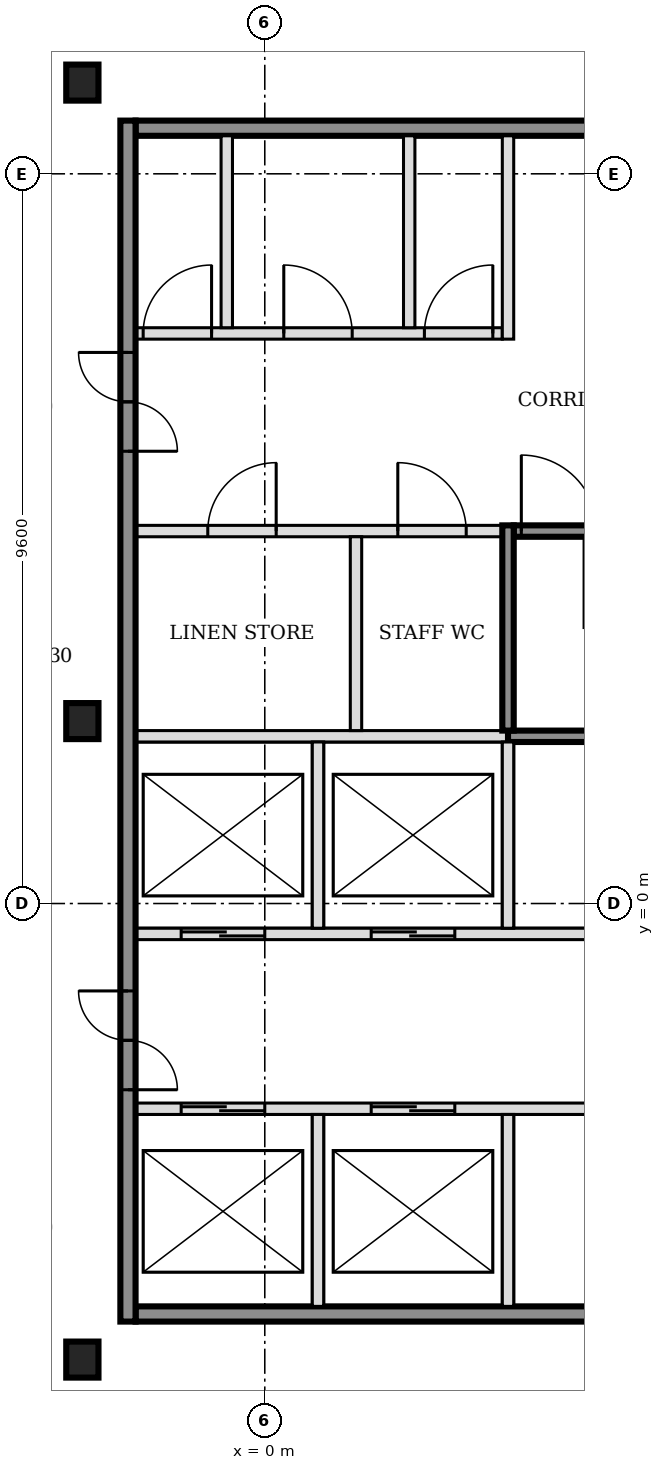
"""IFC4 building model, lengths in metres.
Left out: names, types, materials, properties, quantities, classifications, styles, units other than length and angle.
Written with IfcOpenShell. Run it as: python <this file> out.ifc"""

import sys

from ifc_helpers import new_model, si_unit, direction, frame, frame_2d, origin, origin_2d, place, context, subcontext, project, spatial, rectangle, i_section, extrude, element, fill, save


model = new_model("IFC4")
c1 = context("Model", 3, precision=1e-05, world=origin(), true_north=direction((0.0, 1.0)))
c2 = subcontext(c1, "Body", "Model", "MODEL_VIEW")
j1 = project(units=[si_unit("LENGTHUNIT", "METRE"), si_unit("PLANEANGLEUNIT", "RADIAN")], contexts=[c1])
p1 = place(None, origin())
s1 = spatial("IfcSite", under=j1, at=p1, CompositionType="ELEMENT")
p2 = place(p1, origin())
s2 = spatial("IfcBuilding", under=s1, at=p2, CompositionType="ELEMENT")
p3 = place(p2, frame((0.0, 0.0, 108.6)))
s3 = spatial("IfcBuildingStorey", under=s2, at=p3, CompositionType="ELEMENT", Elevation=108.6)
for number, where, z_axis, x_axis in (
    (1, (-2.4, -6.0, -0.15), (0.0, 0.0, 1.0), (1.0, 0.0, 0.0)),
    (2, (-2.4, 2.4, -0.15), (0.0, 0.0, 1.0), (1.0, 0.0, 0.0)),
    (3, (-2.4, 10.8, -0.15), (0.0, 0.0, 1.0), (1.0, 0.0, 0.0)),
):
    element("IfcColumn", number, at=place(p3, frame(where, z_axis=z_axis, x_axis=x_axis)), inside=s3, PredefinedType="COLUMN", context=c2, shape_type="SweptSolid", body=[
        extrude(i_section(OverallWidth=0.424, OverallDepth=0.474, WebThickness=0.048, FlangeThickness=0.077, FilletRadius=0.015, at=origin_2d()), origin(), (0.0, 0.0, 1.0), 3.6),
    ])
p4 = place(p3, frame((-1.7, -5.4, 0.0), z_axis=(0.0, 0.0, 1.0), x_axis=(1.0, 0.0, 0.0)))
e4 = element("IfcWall", 4, at=p4, inside=s3, PredefinedType="SOLIDWALL", context=c2, shape_type="SweptSolid", body=[
    extrude(rectangle(XDim=7.9, YDim=0.2, at=frame_2d((3.95, 0.0))), origin(), (0.0, 0.0, 1.0), 3.45),
])
p5 = place(p3, frame((-1.7, -2.7, 0.0), z_axis=(0.0, 0.0, 1.0), x_axis=(1.0, 0.0, 0.0)))
e5 = element("IfcWall", 5, at=p5, inside=s3, PredefinedType="SOLIDWALL", context=c2, shape_type="SweptSolid", body=[
    extrude(rectangle(XDim=7.9, YDim=0.15, at=frame_2d((3.95, 0.0))), origin(), (0.0, 0.0, 1.0), 3.45),
])
p6 = place(p5, frame((0.6, 0.0, 0.0)))
e6 = element("IfcOpeningElement", 6, at=p6, cuts=e5, PredefinedType="OPENING", context=c2, shape_type="SweptSolid", body=[
    extrude(rectangle(XDim=1.1, YDim=2.1, at=frame_2d((0.55, 1.05))), frame((0.0, 0.085, 0.0), z_axis=(0.0, -1.0, 0.0), x_axis=(1.0, 0.0, 0.0)), (0.0, 0.0, 1.0), 0.17),
])
p7 = place(p5, frame((3.1, 0.0, 0.0)))
e7 = element("IfcOpeningElement", 7, at=p7, cuts=e5, PredefinedType="OPENING", context=c2, shape_type="SweptSolid", body=[
    extrude(rectangle(XDim=1.1, YDim=2.1, at=frame_2d((0.55, 1.05))), frame((0.0, 0.085, 0.0), z_axis=(0.0, -1.0, 0.0), x_axis=(1.0, 0.0, 0.0)), (0.0, 0.0, 1.0), 0.17),
])
p8 = place(p3, frame((-1.7, -0.4, 0.0), z_axis=(0.0, 0.0, 1.0), x_axis=(1.0, 0.0, 0.0)))
e8 = element("IfcWall", 8, at=p8, inside=s3, PredefinedType="SOLIDWALL", context=c2, shape_type="SweptSolid", body=[
    extrude(rectangle(XDim=15.925, YDim=0.15, at=frame_2d((7.962, 0.0))), origin(), (0.0, 0.0, 1.0), 3.45),
])
p9 = place(p8, frame((0.6, 0.0, 0.0)))
e9 = element("IfcOpeningElement", 9, at=p9, cuts=e8, PredefinedType="OPENING", context=c2, shape_type="SweptSolid", body=[
    extrude(rectangle(XDim=1.1, YDim=2.1, at=frame_2d((0.55, 1.05))), frame((0.0, 0.085, 0.0), z_axis=(0.0, -1.0, 0.0), x_axis=(1.0, 0.0, 0.0)), (0.0, 0.0, 1.0), 0.17),
])
p10 = place(p8, frame((3.1, 0.0, 0.0)))
e10 = element("IfcOpeningElement", 10, at=p10, cuts=e8, PredefinedType="OPENING", context=c2, shape_type="SweptSolid", body=[
    extrude(rectangle(XDim=1.1, YDim=2.1, at=frame_2d((0.55, 1.05))), frame((0.0, 0.085, 0.0), z_axis=(0.0, -1.0, 0.0), x_axis=(1.0, 0.0, 0.0)), (0.0, 0.0, 1.0), 0.17),
])
p11 = place(p8, frame((11.575, 0.0, 0.0)))
e11 = element("IfcOpeningElement", 11, at=p11, cuts=e8, PredefinedType="OPENING", context=c2, shape_type="SweptSolid", body=[
    extrude(rectangle(XDim=1.2, YDim=2.1, at=frame_2d((0.6, 1.05))), frame((0.0, 0.085, 0.0), z_axis=(0.0, -1.0, 0.0), x_axis=(1.0, 0.0, 0.0)), (0.0, 0.0, 1.0), 0.17),
])
p12 = place(p8, frame((14.125, 0.0, 0.0)))
e12 = element("IfcOpeningElement", 12, at=p12, cuts=e8, PredefinedType="OPENING", context=c2, shape_type="SweptSolid", body=[
    extrude(rectangle(XDim=1.2, YDim=2.1, at=frame_2d((0.6, 1.05))), frame((0.0, 0.085, 0.0), z_axis=(0.0, -1.0, 0.0), x_axis=(1.0, 0.0, 0.0)), (0.0, 0.0, 1.0), 0.17),
])
p13 = place(p3, frame((-1.7, 2.2, 0.0), z_axis=(0.0, 0.0, 1.0), x_axis=(1.0, 0.0, 0.0)))
e13 = element("IfcWall", 13, at=p13, inside=s3, PredefinedType="SOLIDWALL", context=c2, shape_type="SweptSolid", body=[
    extrude(rectangle(XDim=4.9, YDim=0.15, at=frame_2d((2.45, 0.0))), origin(), (0.0, 0.0, 1.0), 3.45),
])
p14 = place(p3, frame((3.2, 2.2, 0.0), z_axis=(0.0, 0.0, 1.0), x_axis=(1.0, 0.0, 0.0)))
e14 = element("IfcWall", 14, at=p14, inside=s3, PredefinedType="SOLIDWALL", context=c2, shape_type="SweptSolid", body=[
    extrude(rectangle(XDim=6.5, YDim=0.15, at=frame_2d((3.25, 0.0))), origin(), (0.0, 0.0, 1.0), 3.45),
])
p15 = place(p3, frame((-1.7, 4.9, 0.0), z_axis=(0.0, 0.0, 1.0), x_axis=(1.0, 0.0, 0.0)))
e15 = element("IfcWall", 15, at=p15, inside=s3, PredefinedType="PARTITIONING", context=c2, shape_type="SweptSolid", body=[
    extrude(rectangle(XDim=4.825, YDim=0.15, at=frame_2d((2.413, 0.0))), origin(), (0.0, 0.0, 1.0), 3.45),
])
p16 = place(p15, frame((0.95, 0.0, 0.0)))
e16 = element("IfcOpeningElement", 16, at=p16, cuts=e15, PredefinedType="OPENING", context=c2, shape_type="SweptSolid", body=[
    extrude(rectangle(XDim=0.9, YDim=2.1, at=frame_2d((0.45, 1.05))), frame((0.0, 0.085, 0.0), z_axis=(0.0, -1.0, 0.0), x_axis=(1.0, 0.0, 0.0)), (0.0, 0.0, 1.0), 0.17),
])
p17 = place(p15, frame((3.45, 0.0, 0.0)))
e17 = element("IfcOpeningElement", 17, at=p17, cuts=e15, PredefinedType="OPENING", context=c2, shape_type="SweptSolid", body=[
    extrude(rectangle(XDim=0.9, YDim=2.1, at=frame_2d((0.45, 1.05))), frame((0.0, 0.085, 0.0), z_axis=(0.0, -1.0, 0.0), x_axis=(1.0, 0.0, 0.0)), (0.0, 0.0, 1.0), 0.17),
])
p18 = place(p3, frame((3.275, 4.9, 0.0), z_axis=(0.0, 0.0, 1.0), x_axis=(1.0, 0.0, 0.0)))
e18 = element("IfcWall", 18, at=p18, inside=s3, PredefinedType="SOLIDWALL", context=c2, shape_type="SweptSolid", body=[
    extrude(rectangle(XDim=6.425, YDim=0.15, at=frame_2d((3.212, 0.0))), origin(), (0.0, 0.0, 1.0), 3.45),
])
p19 = place(p18, frame((0.1, 0.0, 0.0)))
e19 = element("IfcOpeningElement", 19, at=p19, cuts=e18, PredefinedType="OPENING", context=c2, shape_type="SweptSolid", body=[
    extrude(rectangle(XDim=1.0, YDim=2.1, at=frame_2d((0.5, 1.05))), frame((0.0, 0.085, 0.0), z_axis=(0.0, -1.0, 0.0), x_axis=(1.0, 0.0, 0.0)), (0.0, 0.0, 1.0), 0.17),
])
p20 = place(p3, frame((-1.7, 7.5, 0.0), z_axis=(0.0, 0.0, 1.0), x_axis=(1.0, 0.0, 0.0)))
e20 = element("IfcWall", 20, at=p20, inside=s3, PredefinedType="PARTITIONING", context=c2, shape_type="SweptSolid", body=[
    extrude(rectangle(XDim=4.825, YDim=0.15, at=frame_2d((2.413, 0.0))), origin(), (0.0, 0.0, 1.0), 3.45),
])
p21 = place(p20, frame((0.1, 0.0, 0.0)))
e21 = element("IfcOpeningElement", 21, at=p21, cuts=e20, PredefinedType="OPENING", context=c2, shape_type="SweptSolid", body=[
    extrude(rectangle(XDim=0.9, YDim=2.1, at=frame_2d((0.45, 1.05))), frame((0.0, 0.085, 0.0), z_axis=(0.0, -1.0, 0.0), x_axis=(1.0, 0.0, 0.0)), (0.0, 0.0, 1.0), 0.17),
])
p22 = place(p20, frame((1.95, 0.0, 0.0)))
e22 = element("IfcOpeningElement", 22, at=p22, cuts=e20, PredefinedType="OPENING", context=c2, shape_type="SweptSolid", body=[
    extrude(rectangle(XDim=0.9, YDim=2.1, at=frame_2d((0.45, 1.05))), frame((0.0, 0.085, 0.0), z_axis=(0.0, -1.0, 0.0), x_axis=(1.0, 0.0, 0.0)), (0.0, 0.0, 1.0), 0.17),
])
p23 = place(p20, frame((3.8, 0.0, 0.0)))
e23 = element("IfcOpeningElement", 23, at=p23, cuts=e20, PredefinedType="OPENING", context=c2, shape_type="SweptSolid", body=[
    extrude(rectangle(XDim=0.9, YDim=2.1, at=frame_2d((0.45, 1.05))), frame((0.0, 0.085, 0.0), z_axis=(0.0, -1.0, 0.0), x_axis=(1.0, 0.0, 0.0)), (0.0, 0.0, 1.0), 0.17),
])
p24 = place(p3, frame((-1.7, 10.2, 0.0), z_axis=(0.0, 0.0, 1.0), x_axis=(1.0, 0.0, 0.0)))
e24 = element("IfcWall", 24, at=p24, inside=s3, PredefinedType="SOLIDWALL", context=c2, shape_type="SweptSolid", body=[
    extrude(rectangle(XDim=7.9, YDim=0.2, at=frame_2d((3.95, 0.0))), origin(), (0.0, 0.0, 1.0), 3.45),
])
p25 = place(p3, frame((-1.8, -5.5, 0.0), z_axis=(0.0, 0.0, 1.0), x_axis=(0.0, 1.0, 0.0)))
e25 = element("IfcWall", 25, at=p25, inside=s3, PredefinedType="SOLIDWALL", context=c2, shape_type="SweptSolid", body=[
    extrude(rectangle(XDim=15.8, YDim=0.2, at=frame_2d((7.9, 0.0))), origin(), (0.0, 0.0, 1.0), 3.45),
])
p26 = place(p25, frame((3.05, 0.0, 0.0)))
e26 = element("IfcOpeningElement", 26, at=p26, cuts=e25, PredefinedType="OPENING", context=c2, shape_type="SweptSolid", body=[
    extrude(rectangle(XDim=1.3, YDim=2.1, at=frame_2d((0.65, 1.05))), frame((0.0, 0.11, 0.0), z_axis=(0.0, -1.0, 0.0), x_axis=(1.0, 0.0, 0.0)), (0.0, 0.0, 1.0), 0.22),
])
p27 = place(p25, frame((11.45, 0.0, 0.0)))
e27 = element("IfcOpeningElement", 27, at=p27, cuts=e25, PredefinedType="OPENING", context=c2, shape_type="SweptSolid", body=[
    extrude(rectangle(XDim=1.3, YDim=2.1, at=frame_2d((0.65, 1.05))), frame((0.0, 0.11, 0.0), z_axis=(0.0, -1.0, 0.0), x_axis=(1.0, 0.0, 0.0)), (0.0, 0.0, 1.0), 0.22),
])
p28 = place(p3, frame((-0.5, 7.575, 0.0), z_axis=(0.0, 0.0, 1.0), x_axis=(0.0, 1.0, 0.0)))
e28 = element("IfcWall", 28, at=p28, inside=s3, PredefinedType="PARTITIONING", context=c2, shape_type="SweptSolid", body=[
    extrude(rectangle(XDim=2.525, YDim=0.15, at=frame_2d((1.263, 0.0))), origin(), (0.0, 0.0, 1.0), 3.45),
])
p29 = place(p3, frame((0.7, -5.3, 0.0), z_axis=(0.0, 0.0, 1.0), x_axis=(0.0, 1.0, 0.0)))
e29 = element("IfcWall", 29, at=p29, inside=s3, PredefinedType="SOLIDWALL", context=c2, shape_type="SweptSolid", body=[
    extrude(rectangle(XDim=2.525, YDim=0.15, at=frame_2d((1.263, 0.0))), origin(), (0.0, 0.0, 1.0), 3.45),
])
p30 = place(p3, frame((0.7, -0.325, 0.0), z_axis=(0.0, 0.0, 1.0), x_axis=(0.0, 1.0, 0.0)))
e30 = element("IfcWall", 30, at=p30, inside=s3, PredefinedType="SOLIDWALL", context=c2, shape_type="SweptSolid", body=[
    extrude(rectangle(XDim=2.45, YDim=0.15, at=frame_2d((1.225, 0.0))), origin(), (0.0, 0.0, 1.0), 3.45),
])
p31 = place(p3, frame((1.2, 2.275, 0.0), z_axis=(0.0, 0.0, 1.0), x_axis=(0.0, 1.0, 0.0)))
e31 = element("IfcWall", 31, at=p31, inside=s3, PredefinedType="PARTITIONING", context=c2, shape_type="SweptSolid", body=[
    extrude(rectangle(XDim=2.55, YDim=0.15, at=frame_2d((1.275, 0.0))), origin(), (0.0, 0.0, 1.0), 3.45),
])
p32 = place(p3, frame((1.9, 7.575, 0.0), z_axis=(0.0, 0.0, 1.0), x_axis=(0.0, 1.0, 0.0)))
e32 = element("IfcWall", 32, at=p32, inside=s3, PredefinedType="PARTITIONING", context=c2, shape_type="SweptSolid", body=[
    extrude(rectangle(XDim=2.525, YDim=0.15, at=frame_2d((1.263, 0.0))), origin(), (0.0, 0.0, 1.0), 3.45),
])
p33 = place(p3, frame((3.2, -5.3, 0.0), z_axis=(0.0, 0.0, 1.0), x_axis=(0.0, 1.0, 0.0)))
e33 = element("IfcWall", 33, at=p33, inside=s3, PredefinedType="SOLIDWALL", context=c2, shape_type="SweptSolid", body=[
    extrude(rectangle(XDim=2.525, YDim=0.15, at=frame_2d((1.263, 0.0))), origin(), (0.0, 0.0, 1.0), 3.45),
])
p34 = place(p3, frame((3.2, -0.325, 0.0), z_axis=(0.0, 0.0, 1.0), x_axis=(0.0, 1.0, 0.0)))
e34 = element("IfcWall", 34, at=p34, inside=s3, PredefinedType="SOLIDWALL", context=c2, shape_type="SweptSolid", body=[
    extrude(rectangle(XDim=2.45, YDim=0.15, at=frame_2d((1.225, 0.0))), origin(), (0.0, 0.0, 1.0), 3.45),
])
p35 = place(p3, frame((3.2, 2.275, 0.0), z_axis=(0.0, 0.0, 1.0), x_axis=(0.0, 1.0, 0.0)))
e35 = element("IfcWall", 35, at=p35, inside=s3, PredefinedType="SOLIDWALL", context=c2, shape_type="SweptSolid", body=[
    extrude(rectangle(XDim=2.7, YDim=0.15, at=frame_2d((1.35, 0.0))), origin(), (0.0, 0.0, 1.0), 3.45),
])
p36 = place(p3, frame((3.2, 7.425, 0.0), z_axis=(0.0, 0.0, 1.0), x_axis=(0.0, 1.0, 0.0)))
e36 = element("IfcWall", 36, at=p36, inside=s3, PredefinedType="PARTITIONING", context=c2, shape_type="SweptSolid", body=[
    extrude(rectangle(XDim=2.675, YDim=0.15, at=frame_2d((1.337, 0.0))), origin(), (0.0, 0.0, 1.0), 3.45),
])
p37 = place(p6, origin())
e37 = element("IfcDoor", 37, at=p37, inside=s3, OperationType="DOUBLE_DOOR_SLIDING", PredefinedType="DOOR", context=c2, shape_type="SweptSolid", body=[
    extrude(rectangle(XDim=1.1, YDim=2.1, at=frame_2d((0.55, 1.05))), frame((0.0, 0.025, 0.0), z_axis=(0.0, -1.0, 0.0), x_axis=(1.0, 0.0, 0.0)), (0.0, 0.0, 1.0), 0.05),
])
fill(e6, e37)
p38 = place(p7, origin())
e38 = element("IfcDoor", 38, at=p38, inside=s3, OperationType="DOUBLE_DOOR_SLIDING", PredefinedType="DOOR", context=c2, shape_type="SweptSolid", body=[
    extrude(rectangle(XDim=1.1, YDim=2.1, at=frame_2d((0.55, 1.05))), frame((0.0, 0.025, 0.0), z_axis=(0.0, -1.0, 0.0), x_axis=(1.0, 0.0, 0.0)), (0.0, 0.0, 1.0), 0.05),
])
fill(e7, e38)
p39 = place(p9, origin())
e39 = element("IfcDoor", 39, at=p39, inside=s3, OperationType="DOUBLE_DOOR_SLIDING", PredefinedType="DOOR", context=c2, shape_type="SweptSolid", body=[
    extrude(rectangle(XDim=1.1, YDim=2.1, at=frame_2d((0.55, 1.05))), frame((0.0, 0.025, 0.0), z_axis=(0.0, -1.0, 0.0), x_axis=(1.0, 0.0, 0.0)), (0.0, 0.0, 1.0), 0.05),
])
fill(e9, e39)
p40 = place(p10, origin())
e40 = element("IfcDoor", 40, at=p40, inside=s3, OperationType="DOUBLE_DOOR_SLIDING", PredefinedType="DOOR", context=c2, shape_type="SweptSolid", body=[
    extrude(rectangle(XDim=1.1, YDim=2.1, at=frame_2d((0.55, 1.05))), frame((0.0, 0.025, 0.0), z_axis=(0.0, -1.0, 0.0), x_axis=(1.0, 0.0, 0.0)), (0.0, 0.0, 1.0), 0.05),
])
fill(e10, e40)
p41 = place(p19, origin())
e41 = element("IfcDoor", 41, at=p41, inside=s3, OperationType="SINGLE_SWING_LEFT", PredefinedType="DOOR", context=c2, shape_type="SweptSolid", body=[
    extrude(rectangle(XDim=1.0, YDim=2.1, at=frame_2d((0.5, 1.05))), frame((0.0, 0.025, 0.0), z_axis=(0.0, -1.0, 0.0), x_axis=(1.0, 0.0, 0.0)), (0.0, 0.0, 1.0), 0.05),
])
fill(e19, e41)
p42 = place(p26, origin())
e42 = element("IfcDoor", 42, at=p42, inside=s3, OperationType="DOUBLE_DOOR_SINGLE_SWING", PredefinedType="DOOR", context=c2, shape_type="SweptSolid", body=[
    extrude(rectangle(XDim=1.3, YDim=2.1, at=frame_2d((0.65, 1.05))), frame((0.0, 0.025, 0.0), z_axis=(0.0, -1.0, 0.0), x_axis=(1.0, 0.0, 0.0)), (0.0, 0.0, 1.0), 0.05),
])
fill(e26, e42)
p43 = place(p27, origin())
e43 = element("IfcDoor", 43, at=p43, inside=s3, OperationType="DOUBLE_DOOR_SINGLE_SWING", PredefinedType="DOOR", context=c2, shape_type="SweptSolid", body=[
    extrude(rectangle(XDim=1.3, YDim=2.1, at=frame_2d((0.65, 1.05))), frame((0.0, 0.025, 0.0), z_axis=(0.0, -1.0, 0.0), x_axis=(1.0, 0.0, 0.0)), (0.0, 0.0, 1.0), 0.05),
])
fill(e27, e43)
p44 = place(p16, origin())
e44 = element("IfcDoor", 44, at=p44, inside=s3, OperationType="SINGLE_SWING_RIGHT", PredefinedType="DOOR", context=c2, shape_type="SweptSolid", body=[
    extrude(rectangle(XDim=0.9, YDim=2.1, at=frame_2d((0.45, 1.05))), frame((0.0, 0.025, 0.0), z_axis=(0.0, -1.0, 0.0), x_axis=(1.0, 0.0, 0.0)), (0.0, 0.0, 1.0), 0.05),
])
fill(e16, e44)
p45 = place(p17, origin())
e45 = element("IfcDoor", 45, at=p45, inside=s3, OperationType="SINGLE_SWING_LEFT", PredefinedType="DOOR", context=c2, shape_type="SweptSolid", body=[
    extrude(rectangle(XDim=0.9, YDim=2.1, at=frame_2d((0.45, 1.05))), frame((0.0, 0.025, 0.0), z_axis=(0.0, -1.0, 0.0), x_axis=(1.0, 0.0, 0.0)), (0.0, 0.0, 1.0), 0.05),
])
fill(e17, e45)
p46 = place(p21, origin())
e46 = element("IfcDoor", 46, at=p46, inside=s3, OperationType="SINGLE_SWING_RIGHT", PredefinedType="DOOR", context=c2, shape_type="SweptSolid", body=[
    extrude(rectangle(XDim=0.9, YDim=2.1, at=frame_2d((0.45, 1.05))), frame((0.0, 0.025, 0.0), z_axis=(0.0, -1.0, 0.0), x_axis=(1.0, 0.0, 0.0)), (0.0, 0.0, 1.0), 0.05),
])
fill(e21, e46)
p47 = place(p22, origin())
e47 = element("IfcDoor", 47, at=p47, inside=s3, OperationType="SINGLE_SWING_LEFT", PredefinedType="DOOR", context=c2, shape_type="SweptSolid", body=[
    extrude(rectangle(XDim=0.9, YDim=2.1, at=frame_2d((0.45, 1.05))), frame((0.0, 0.025, 0.0), z_axis=(0.0, -1.0, 0.0), x_axis=(1.0, 0.0, 0.0)), (0.0, 0.0, 1.0), 0.05),
])
fill(e22, e47)
p48 = place(p23, origin())
e48 = element("IfcDoor", 48, at=p48, inside=s3, OperationType="SINGLE_SWING_RIGHT", PredefinedType="DOOR", context=c2, shape_type="SweptSolid", body=[
    extrude(rectangle(XDim=0.9, YDim=2.1, at=frame_2d((0.45, 1.05))), frame((0.0, 0.025, 0.0), z_axis=(0.0, -1.0, 0.0), x_axis=(1.0, 0.0, 0.0)), (0.0, 0.0, 1.0), 0.05),
])
fill(e23, e48)
save(model, sys.argv[1])
